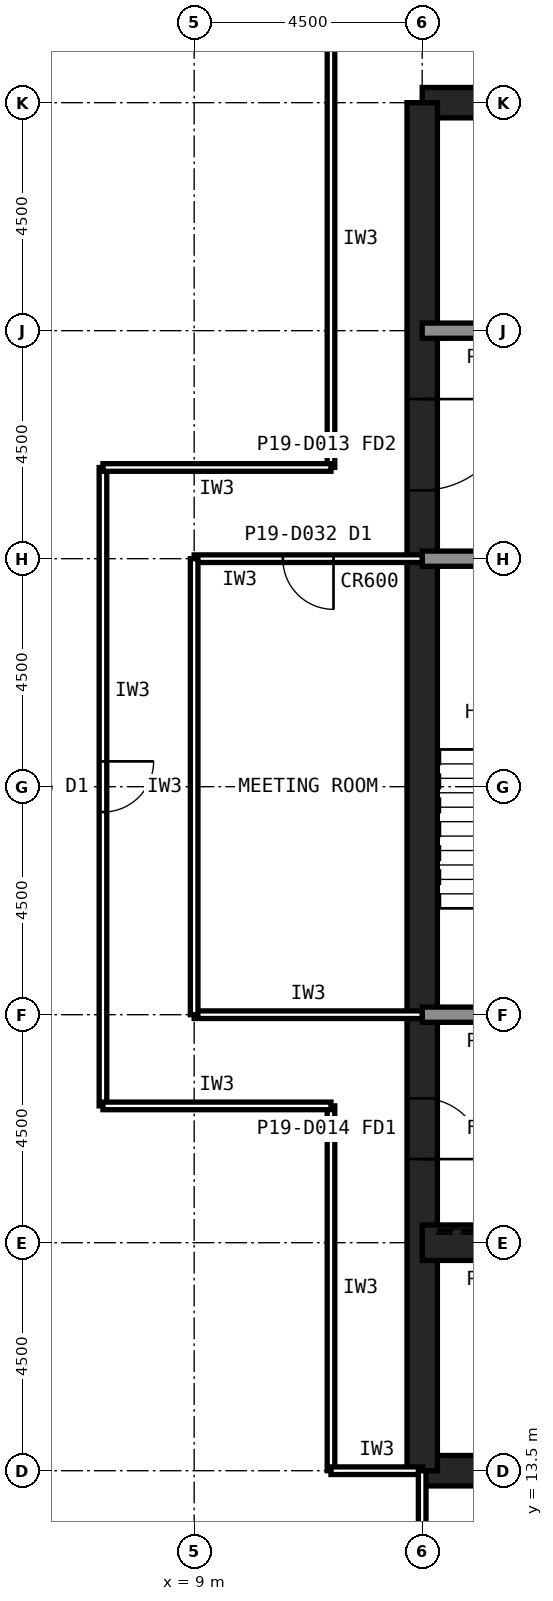
"""IFC4 building model, lengths in metres.
Left out: names, types, materials, properties, quantities, classifications, styles, units other than length and angle.
Written with IfcOpenShell. Run it as: python <this file> out.ifc"""

import sys

from ifc_helpers import new_model, si_unit, direction, frame, frame_2d, origin, place, context, subcontext, project, spatial, rectangle, extrude, element, fill, save


model = new_model("IFC4")
c1 = context("Model", 3, precision=1e-05, world=origin(), true_north=direction((0.0, 1.0)))
c2 = subcontext(c1, "Body", "Model", "MODEL_VIEW")
j1 = project(units=[si_unit("LENGTHUNIT", "METRE"), si_unit("PLANEANGLEUNIT", "RADIAN")], contexts=[c1])
p1 = place(None, origin())
s1 = spatial("IfcSite", under=j1, at=p1, CompositionType="ELEMENT")
p2 = place(p1, origin())
s2 = spatial("IfcBuilding", under=s1, at=p2, CompositionType="ELEMENT")
p3 = place(p2, frame((0.0, 0.0, 79.4)))
s3 = spatial("IfcBuildingStorey", under=s2, at=p3, CompositionType="ELEMENT", Elevation=79.4)
for number, where, z_axis, x_axis in (
    (1, (13.5, 13.5, 0.0), (0.0, 0.0, 1.0), (1.0, 0.0, 0.0)),
    (2, (40.5, 40.5, 0.0), (0.0, 0.0, 1.0), (-1.0, 0.0, 0.0)),
):
    element("IfcWall", number, at=place(p3, frame(where, z_axis=z_axis, x_axis=x_axis)), inside=s3, PredefinedType="SHEAR", context=c2, shape_type="SweptSolid", body=[
        extrude(rectangle(XDim=27.0, YDim=0.6, at=frame_2d((13.5, 0.0))), origin(), (0.0, 0.0, 1.0), 4.2),
    ])
p4 = place(p3, frame((13.5, 40.5, 0.0), z_axis=(0.0, 0.0, 1.0), x_axis=(0.0, -1.0, 0.0)))
e3 = element("IfcWall", 3, at=p4, inside=s3, PredefinedType="SHEAR", context=c2, shape_type="SweptSolid", body=[
    extrude(rectangle(XDim=27.0, YDim=0.6, at=frame_2d((13.5, 0.0))), origin(), (0.0, 0.0, 1.0), 4.2),
])
p5 = place(p4, frame((19.65, 0.0, 0.0)))
e4 = element("IfcOpeningElement", 4, at=p5, cuts=e3, PredefinedType="OPENING", context=c2, shape_type="SweptSolid", body=[
    extrude(rectangle(XDim=1.2, YDim=2.1, at=frame_2d((0.6, 1.05))), frame((0.0, 0.31, 0.0), z_axis=(0.0, -1.0, 0.0), x_axis=(1.0, 0.0, 0.0)), (0.0, 0.0, 1.0), 0.62),
])
p6 = place(p4, frame((5.85, 0.0, 0.0)))
e5 = element("IfcOpeningElement", 5, at=p6, cuts=e3, PredefinedType="OPENING", context=c2, shape_type="SweptSolid", body=[
    extrude(rectangle(XDim=1.8, YDim=2.1, at=frame_2d((0.9, 1.05))), frame((0.0, 0.31, 0.0), z_axis=(0.0, -1.0, 0.0), x_axis=(1.0, 0.0, 0.0)), (0.0, 0.0, 1.0), 0.62),
])
p7 = place(p3, frame((13.5, 18.0, 0.0), z_axis=(0.0, 0.0, 1.0), x_axis=(1.0, 0.0, 0.0)))
e6 = element("IfcWall", 6, at=p7, inside=s3, PredefinedType="SHEAR", context=c2, shape_type="SweptSolid", body=[
    extrude(rectangle(XDim=27.0, YDim=0.7, at=frame_2d((13.5, 0.0))), origin(), (0.0, 0.0, 1.0), 4.2),
])
p8 = place(p7, frame((24.3, 0.0, 0.0)))
e7 = element("IfcOpeningElement", 7, at=p8, cuts=e6, PredefinedType="OPENING", context=c2, shape_type="SweptSolid", body=[
    extrude(rectangle(XDim=0.9, YDim=2.1, at=frame_2d((0.45, 1.05))), frame((0.0, 0.36, 0.0), z_axis=(0.0, -1.0, 0.0), x_axis=(1.0, 0.0, 0.0)), (0.0, 0.0, 1.0), 0.72),
])
p9 = place(p7, frame((5.45, 0.0, 0.0)))
e8 = element("IfcOpeningElement", 8, at=p9, cuts=e6, PredefinedType="OPENING", context=c2, shape_type="SweptSolid", body=[
    extrude(rectangle(XDim=1.1, YDim=2.1, at=frame_2d((0.55, 1.05))), frame((0.0, 0.36, 0.0), z_axis=(0.0, -1.0, 0.0), x_axis=(1.0, 0.0, 0.0)), (0.0, 0.0, 1.0), 0.72),
])
p10 = place(p7, frame((8.45, 0.0, 0.0)))
e9 = element("IfcOpeningElement", 9, at=p10, cuts=e6, PredefinedType="OPENING", context=c2, shape_type="SweptSolid", body=[
    extrude(rectangle(XDim=1.1, YDim=2.1, at=frame_2d((0.55, 1.05))), frame((0.0, 0.36, 0.0), z_axis=(0.0, -1.0, 0.0), x_axis=(1.0, 0.0, 0.0)), (0.0, 0.0, 1.0), 0.72),
])
p11 = place(p7, frame((11.45, 0.0, 0.0)))
e10 = element("IfcOpeningElement", 10, at=p11, cuts=e6, PredefinedType="OPENING", context=c2, shape_type="SweptSolid", body=[
    extrude(rectangle(XDim=1.1, YDim=2.1, at=frame_2d((0.55, 1.05))), frame((0.0, 0.36, 0.0), z_axis=(0.0, -1.0, 0.0), x_axis=(1.0, 0.0, 0.0)), (0.0, 0.0, 1.0), 0.72),
])
p12 = place(p7, frame((14.45, 0.0, 0.0)))
e11 = element("IfcOpeningElement", 11, at=p12, cuts=e6, PredefinedType="OPENING", context=c2, shape_type="SweptSolid", body=[
    extrude(rectangle(XDim=1.1, YDim=2.1, at=frame_2d((0.55, 1.05))), frame((0.0, 0.36, 0.0), z_axis=(0.0, -1.0, 0.0), x_axis=(1.0, 0.0, 0.0)), (0.0, 0.0, 1.0), 0.72),
])
p13 = place(p7, frame((17.45, 0.0, 0.0)))
e12 = element("IfcOpeningElement", 12, at=p13, cuts=e6, PredefinedType="OPENING", context=c2, shape_type="SweptSolid", body=[
    extrude(rectangle(XDim=1.1, YDim=2.1, at=frame_2d((0.55, 1.05))), frame((0.0, 0.36, 0.0), z_axis=(0.0, -1.0, 0.0), x_axis=(1.0, 0.0, 0.0)), (0.0, 0.0, 1.0), 0.72),
])
p14 = place(p7, frame((20.45, 0.0, 0.0)))
e13 = element("IfcOpeningElement", 13, at=p14, cuts=e6, PredefinedType="OPENING", context=c2, shape_type="SweptSolid", body=[
    extrude(rectangle(XDim=1.1, YDim=2.1, at=frame_2d((0.55, 1.05))), frame((0.0, 0.36, 0.0), z_axis=(0.0, -1.0, 0.0), x_axis=(1.0, 0.0, 0.0)), (0.0, 0.0, 1.0), 0.72),
])
p15 = place(p7, frame((1.6, 0.0, 0.0)))
e14 = element("IfcOpeningElement", 14, at=p15, cuts=e6, PredefinedType="OPENING", context=c2, shape_type="SweptSolid", body=[
    extrude(rectangle(XDim=1.3, YDim=2.2, at=frame_2d((0.65, 1.1))), frame((0.0, 0.36, 0.0), z_axis=(0.0, -1.0, 0.0), x_axis=(1.0, 0.0, 0.0)), (0.0, 0.0, 1.0), 0.72),
])
p16 = place(p3, frame((13.5, 36.0, 0.0), z_axis=(0.0, 0.0, 1.0), x_axis=(1.0, 0.0, 0.0)))
e15 = element("IfcWall", 15, at=p16, inside=s3, PredefinedType="SOLIDWALL", context=c2, shape_type="SweptSolid", body=[
    extrude(rectangle(XDim=27.0, YDim=0.3, at=frame_2d((13.5, 0.0))), origin(), (0.0, 0.0, 1.0), 4.04),
])
p17 = place(p16, frame((1.8, 0.0, 0.0)))
e16 = element("IfcOpeningElement", 16, at=p17, cuts=e15, PredefinedType="OPENING", context=c2, shape_type="SweptSolid", body=[
    extrude(rectangle(XDim=0.9, YDim=2.1, at=frame_2d((0.45, 1.05))), frame((0.0, 0.16, 0.0), z_axis=(0.0, -1.0, 0.0), x_axis=(1.0, 0.0, 0.0)), (0.0, 0.0, 1.0), 0.32),
])
p18 = place(p16, frame((24.1, 0.0, 0.0)))
e17 = element("IfcOpeningElement", 17, at=p18, cuts=e15, PredefinedType="OPENING", context=c2, shape_type="SweptSolid", body=[
    extrude(rectangle(XDim=1.3, YDim=2.2, at=frame_2d((0.65, 1.1))), frame((0.0, 0.16, 0.0), z_axis=(0.0, -1.0, 0.0), x_axis=(1.0, 0.0, 0.0)), (0.0, 0.0, 1.0), 0.32),
])
p19 = place(p3, frame((13.5, 22.5, 0.0), z_axis=(0.0, 0.0, 1.0), x_axis=(1.0, 0.0, 0.0)))
e18 = element("IfcWall", 18, at=p19, inside=s3, PredefinedType="SOLIDWALL", context=c2, shape_type="SweptSolid", body=[
    extrude(rectangle(XDim=27.0, YDim=0.3, at=frame_2d((13.5, 0.0))), origin(), (0.0, 0.0, 1.0), 4.04),
])
p20 = place(p19, frame((1.65, 0.0, 0.0)))
e19 = element("IfcOpeningElement", 19, at=p20, cuts=e18, PredefinedType="OPENING", context=c2, shape_type="SweptSolid", body=[
    extrude(rectangle(XDim=1.2, YDim=2.1, at=frame_2d((0.6, 1.05))), frame((0.0, 0.16, 0.0), z_axis=(0.0, -1.0, 0.0), x_axis=(1.0, 0.0, 0.0)), (0.0, 0.0, 1.0), 0.32),
])
p21 = place(p19, frame((6.025, 0.0, 0.0)))
e20 = element("IfcOpeningElement", 20, at=p21, cuts=e18, PredefinedType="OPENING", context=c2, shape_type="SweptSolid", body=[
    extrude(rectangle(XDim=1.0, YDim=2.1, at=frame_2d((0.5, 1.05))), frame((0.0, 0.16, 0.0), z_axis=(0.0, -1.0, 0.0), x_axis=(1.0, 0.0, 0.0)), (0.0, 0.0, 1.0), 0.32),
])
p22 = place(p19, frame((10.525, 0.0, 0.0)))
e21 = element("IfcOpeningElement", 21, at=p22, cuts=e18, PredefinedType="OPENING", context=c2, shape_type="SweptSolid", body=[
    extrude(rectangle(XDim=1.0, YDim=2.1, at=frame_2d((0.5, 1.05))), frame((0.0, 0.16, 0.0), z_axis=(0.0, -1.0, 0.0), x_axis=(1.0, 0.0, 0.0)), (0.0, 0.0, 1.0), 0.32),
])
p23 = place(p19, frame((19.75, 0.0, 0.0)))
e22 = element("IfcOpeningElement", 22, at=p23, cuts=e18, PredefinedType="OPENING", context=c2, shape_type="SweptSolid", body=[
    extrude(rectangle(XDim=1.0, YDim=2.1, at=frame_2d((0.5, 1.05))), frame((0.0, 0.16, 0.0), z_axis=(0.0, -1.0, 0.0), x_axis=(1.0, 0.0, 0.0)), (0.0, 0.0, 1.0), 0.32),
])
p24 = place(p19, frame((15.05, 0.0, 0.0)))
e23 = element("IfcOpeningElement", 23, at=p24, cuts=e18, PredefinedType="OPENING", context=c2, shape_type="SweptSolid", body=[
    extrude(rectangle(XDim=1.4, YDim=2.4, at=frame_2d((0.7, 1.2))), frame((0.0, 0.16, 0.0), z_axis=(0.0, -1.0, 0.0), x_axis=(1.0, 0.0, 0.0)), (0.0, 0.0, 1.0), 0.32),
])
p25 = place(p3, frame((13.5, 31.5, 0.0), z_axis=(0.0, 0.0, 1.0), x_axis=(1.0, 0.0, 0.0)))
e24 = element("IfcWall", 24, at=p25, inside=s3, PredefinedType="SOLIDWALL", context=c2, shape_type="SweptSolid", body=[
    extrude(rectangle(XDim=27.0, YDim=0.3, at=frame_2d((13.5, 0.0))), origin(), (0.0, 0.0, 1.0), 4.04),
])
p26 = place(p25, frame((24.15, 0.0, 0.0)))
e25 = element("IfcOpeningElement", 25, at=p26, cuts=e24, PredefinedType="OPENING", context=c2, shape_type="SweptSolid", body=[
    extrude(rectangle(XDim=1.2, YDim=2.1, at=frame_2d((0.6, 1.05))), frame((0.0, 0.16, 0.0), z_axis=(0.0, -1.0, 0.0), x_axis=(1.0, 0.0, 0.0)), (0.0, 0.0, 1.0), 0.32),
])
p27 = place(p25, frame((15.3, 0.0, 0.0)))
e26 = element("IfcOpeningElement", 26, at=p27, cuts=e24, PredefinedType="OPENING", context=c2, shape_type="SweptSolid", body=[
    extrude(rectangle(XDim=0.9, YDim=2.1, at=frame_2d((0.45, 1.05))), frame((0.0, 0.16, 0.0), z_axis=(0.0, -1.0, 0.0), x_axis=(1.0, 0.0, 0.0)), (0.0, 0.0, 1.0), 0.32),
])
p28 = place(p25, frame((19.8, 0.0, 0.0)))
e27 = element("IfcOpeningElement", 27, at=p28, cuts=e24, PredefinedType="OPENING", context=c2, shape_type="SweptSolid", body=[
    extrude(rectangle(XDim=0.9, YDim=2.1, at=frame_2d((0.45, 1.05))), frame((0.0, 0.16, 0.0), z_axis=(0.0, -1.0, 0.0), x_axis=(1.0, 0.0, 0.0)), (0.0, 0.0, 1.0), 0.32),
])
p29 = place(p3, frame((7.2, 33.3, 0.0), z_axis=(0.0, 0.0, 1.0), x_axis=(0.0, -1.0, 0.0)))
e28 = element("IfcWall", 28, at=p29, inside=s3, PredefinedType="PARTITIONING", context=c2, shape_type="SweptSolid", body=[
    extrude(rectangle(XDim=12.6, YDim=0.15, at=frame_2d((6.3, 0.0))), origin(), (0.0, 0.0, 1.0), 4.04),
])
p30 = place(p29, frame((5.8, 0.0, 0.0)))
e29 = element("IfcOpeningElement", 29, at=p30, cuts=e28, PredefinedType="OPENING", context=c2, shape_type="SweptSolid", body=[
    extrude(rectangle(XDim=1.0, YDim=2.1, at=frame_2d((0.5, 1.05))), frame((0.0, 0.085, 0.0), z_axis=(0.0, -1.0, 0.0), x_axis=(1.0, 0.0, 0.0)), (0.0, 0.0, 1.0), 0.17),
])
for number, where, z_axis, x_axis in (
    (30, (11.7, 20.7, 0.0), (0.0, 0.0, 1.0), (0.0, -1.0, 0.0)),
    (31, (11.7, 40.5, 0.0), (0.0, 0.0, 1.0), (0.0, -1.0, 0.0)),
):
    element("IfcWall", number, at=place(p3, frame(where, z_axis=z_axis, x_axis=x_axis)), inside=s3, PredefinedType="PARTITIONING", context=c2, shape_type="SweptSolid", body=[
        extrude(rectangle(XDim=7.2, YDim=0.15, at=frame_2d((3.6, 0.0))), origin(), (0.0, 0.0, 1.0), 4.04),
    ])
for number, where, z_axis, x_axis in (
    (32, (7.2, 20.7, 0.0), (0.0, 0.0, 1.0), (1.0, 0.0, 0.0)),
    (33, (11.7, 33.3, 0.0), (0.0, 0.0, 1.0), (-1.0, 0.0, 0.0)),
):
    element("IfcWall", number, at=place(p3, frame(where, z_axis=z_axis, x_axis=x_axis)), inside=s3, PredefinedType="PARTITIONING", context=c2, shape_type="SweptSolid", body=[
        extrude(rectangle(XDim=4.5, YDim=0.15, at=frame_2d((2.25, 0.0))), origin(), (0.0, 0.0, 1.0), 4.04),
    ])
for number, where, z_axis, x_axis in (
    (34, (11.7, 13.5, 0.0), (0.0, 0.0, 1.0), (1.0, 0.0, 0.0)),
    (35, (13.51, 40.5, 0.0), (0.0, 0.0, 1.0), (-1.0, 0.0, 0.0)),
):
    element("IfcWall", number, at=place(p3, frame(where, z_axis=z_axis, x_axis=x_axis)), inside=s3, PredefinedType="PARTITIONING", context=c2, shape_type="SweptSolid", body=[
        extrude(rectangle(XDim=1.81, YDim=0.15, at=frame_2d((0.905, 0.0))), origin(), (0.0, 0.0, 1.0), 3.189),
    ])
p31 = place(p3, frame((9.0, 22.5, 0.0), z_axis=(0.0, 0.0, 1.0), x_axis=(1.0, 0.0, 0.0)))
e36 = element("IfcWall", 36, at=p31, inside=s3, PredefinedType="PARTITIONING", context=c2, shape_type="SweptSolid", body=[
    extrude(rectangle(XDim=4.5, YDim=0.15, at=frame_2d((2.25, 0.0))), origin(), (0.0, 0.0, 1.0), 3.189),
])
p32 = place(p3, frame((13.5, 31.5, 0.0), z_axis=(0.0, 0.0, 1.0), x_axis=(-1.0, 0.0, 0.0)))
e37 = element("IfcWall", 37, at=p32, inside=s3, PredefinedType="PARTITIONING", context=c2, shape_type="SweptSolid", body=[
    extrude(rectangle(XDim=4.5, YDim=0.15, at=frame_2d((2.25, 0.0))), origin(), (0.0, 0.0, 1.0), 3.189),
])
p33 = place(p32, frame((1.75, 0.0, 0.0)))
e38 = element("IfcOpeningElement", 38, at=p33, cuts=e37, PredefinedType="OPENING", context=c2, shape_type="SweptSolid", body=[
    extrude(rectangle(XDim=1.0, YDim=2.1, at=frame_2d((0.5, 1.05))), frame((0.0, 0.085, 0.0), z_axis=(0.0, -1.0, 0.0), x_axis=(1.0, 0.0, 0.0)), (0.0, 0.0, 1.0), 0.17),
])
p34 = place(p3, frame((9.0, 31.5, 0.0), z_axis=(0.0, 0.0, 1.0), x_axis=(0.0, -1.0, 0.0)))
e39 = element("IfcWall", 39, at=p34, inside=s3, PredefinedType="PARTITIONING", context=c2, shape_type="SweptSolid", body=[
    extrude(rectangle(XDim=9.0, YDim=0.15, at=frame_2d((4.5, 0.0))), origin(), (0.0, 0.0, 1.0), 4.04),
])
p35 = place(p3, frame((13.5, 40.5, 0.0), z_axis=(0.0, 0.0, 1.0), x_axis=(0.0, 1.0, 0.0)))
e40 = element("IfcWall", 40, at=p35, inside=s3, PredefinedType="PARTITIONING", context=c2, shape_type="SweptSolid", body=[
    extrude(rectangle(XDim=13.055, YDim=0.15, at=frame_2d((6.527, 0.0))), origin(), (0.0, 0.0, 1.0), 3.189),
])
p36 = place(p35, frame((6.028, 0.0, 0.0)))
e41 = element("IfcOpeningElement", 41, at=p36, cuts=e40, PredefinedType="OPENING", context=c2, shape_type="SweptSolid", body=[
    extrude(rectangle(XDim=1.0, YDim=2.1, at=frame_2d((0.5, 1.05))), frame((0.0, 0.085, 0.0), z_axis=(0.0, -1.0, 0.0), x_axis=(1.0, 0.0, 0.0)), (0.0, 0.0, 1.0), 0.17),
])
p37 = place(p3, frame((13.5, 5.4, 0.0), z_axis=(0.0, 0.0, 1.0), x_axis=(0.0, 1.0, 0.0)))
e42 = element("IfcWall", 42, at=p37, inside=s3, PredefinedType="PARTITIONING", context=c2, shape_type="SweptSolid", body=[
    extrude(rectangle(XDim=8.1, YDim=0.15, at=frame_2d((4.05, 0.0))), origin(), (0.0, 0.0, 1.0), 3.189),
])
p38 = place(p37, frame((3.55, 0.0, 0.0)))
e43 = element("IfcOpeningElement", 43, at=p38, cuts=e42, PredefinedType="OPENING", context=c2, shape_type="SweptSolid", body=[
    extrude(rectangle(XDim=1.0, YDim=2.1, at=frame_2d((0.5, 1.05))), frame((0.0, 0.085, 0.0), z_axis=(0.0, -1.0, 0.0), x_axis=(1.0, 0.0, 0.0)), (0.0, 0.0, 1.0), 0.17),
])
p39 = place(p5, origin())
e44 = element("IfcDoor", 44, at=p39, inside=s3, OperationType="SINGLE_SWING_RIGHT", PredefinedType="DOOR", context=c2, shape_type="SweptSolid", body=[
    extrude(rectangle(XDim=1.2, YDim=2.1, at=frame_2d((0.6, 1.05))), frame((0.0, 0.025, 0.0), z_axis=(0.0, -1.0, 0.0), x_axis=(1.0, 0.0, 0.0)), (0.0, 0.0, 1.0), 0.05),
])
fill(e4, e44)
p40 = place(p6, origin())
e45 = element("IfcDoor", 45, at=p40, inside=s3, OperationType="SINGLE_SWING_LEFT", PredefinedType="DOOR", context=c2, shape_type="SweptSolid", body=[
    extrude(rectangle(XDim=1.8, YDim=2.1, at=frame_2d((0.9, 1.05))), frame((0.0, 0.025, 0.0), z_axis=(0.0, -1.0, 0.0), x_axis=(1.0, 0.0, 0.0)), (0.0, 0.0, 1.0), 0.05),
])
fill(e5, e45)
p41 = place(p30, origin())
e46 = element("IfcDoor", 46, at=p41, inside=s3, OperationType="SINGLE_SWING_LEFT", PredefinedType="DOOR", context=c2, shape_type="SweptSolid", body=[
    extrude(rectangle(XDim=1.0, YDim=2.1, at=frame_2d((0.5, 1.05))), frame((0.0, 0.025, 0.0), z_axis=(0.0, -1.0, 0.0), x_axis=(1.0, 0.0, 0.0)), (0.0, 0.0, 1.0), 0.05),
])
fill(e29, e46)
p42 = place(p33, origin())
e47 = element("IfcDoor", 47, at=p42, inside=s3, OperationType="SINGLE_SWING_LEFT", PredefinedType="DOOR", context=c2, shape_type="SweptSolid", body=[
    extrude(rectangle(XDim=1.0, YDim=2.1, at=frame_2d((0.5, 1.05))), frame((0.0, 0.025, 0.0), z_axis=(0.0, -1.0, 0.0), x_axis=(1.0, 0.0, 0.0)), (0.0, 0.0, 1.0), 0.05),
])
fill(e38, e47)
save(model, sys.argv[1])
